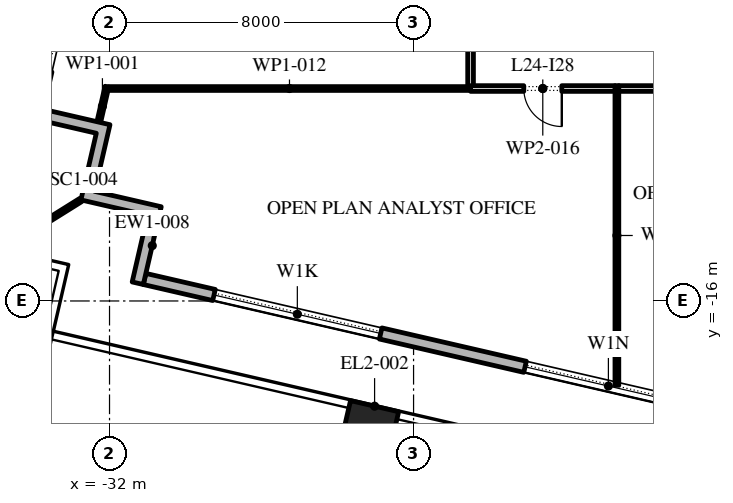
"""IFC4 building model, lengths in metres.
Left out: names, types, materials, properties, quantities, classifications, styles, units other than length and angle.
Written with IfcOpenShell. Run it as: python <this file> out.ifc"""

import sys

from ifc_helpers import new_model, si_unit, direction, frame, frame_2d, origin, origin_2d, place, context, subcontext, project, spatial, polyline, rectangle, outline, extrude, element, fill, save


model = new_model("IFC4")
c1 = context("Model", 3, precision=1e-05, world=origin(), true_north=direction((0.0, 1.0)))
c2 = subcontext(c1, "Body", "Model", "MODEL_VIEW")
j1 = project(units=[si_unit("LENGTHUNIT", "METRE"), si_unit("PLANEANGLEUNIT", "RADIAN")], contexts=[c1])
p1 = place(None, origin())
s1 = spatial("IfcSite", under=j1, at=p1, CompositionType="ELEMENT")
p2 = place(p1, origin())
s2 = spatial("IfcBuilding", under=s1, at=p2, CompositionType="ELEMENT")
p3 = place(p2, frame((0.0, 0.0, 114.0)))
s3 = spatial("IfcBuildingStorey", under=s2, at=p3, CompositionType="ELEMENT", Elevation=114.0)
for number, where, z_axis, x_axis in (
    (1, (-34.282, -17.298, 0.0), (0.0, 0.0, 1.0), (0.974, -0.225, 0.0)),
    (2, (-25.172, -19.402, 0.0), (0.0, 0.0, 1.0), (0.974, -0.225, 0.0)),
):
    element("IfcColumn", number, at=place(p3, frame(where, z_axis=z_axis, x_axis=x_axis)), inside=s3, PredefinedType="COLUMN", context=c2, shape_type="SweptSolid", body=[
        extrude(rectangle(XDim=1.3, YDim=1.3, at=origin_2d()), origin(), (0.0, 0.0, 1.0), 4.2),
    ])
p4 = place(p3, frame((-31.078, -15.421, 0.0), z_axis=(0.0, 0.0, 1.0), x_axis=(0.974370456532, -0.224949357493, 0.0)))
e3 = element("IfcWall", 3, at=p4, inside=s3, PredefinedType="STANDARD", context=c2, shape_type="SweptSolid", body=[
    extrude(rectangle(XDim=51.0, YDim=0.3, at=frame_2d((25.5, 0.0))), origin(), (0.0, 0.0, 1.0), 4.0),
])
p5 = place(p4, frame((1.875, 0.0, 0.45)))
e4 = element("IfcOpeningElement", 4, at=p5, cuts=e3, PredefinedType="OPENING", context=c2, shape_type="SweptSolid", body=[
    extrude(rectangle(XDim=4.5, YDim=2.65, at=frame_2d((2.25, 1.325))), frame((0.0, 0.16, 0.0), z_axis=(0.0, -1.0, 0.0), x_axis=(1.0, 0.0, 0.0)), (0.0, 0.0, 1.0), 0.32),
])
p6 = place(p4, frame((10.275, 0.0, 0.45)))
e5 = element("IfcOpeningElement", 5, at=p6, cuts=e3, PredefinedType="OPENING", context=c2, shape_type="SweptSolid", body=[
    extrude(rectangle(XDim=4.5, YDim=2.525, at=frame_2d((2.25, 1.262))), frame((0.0, 0.16, 0.0), z_axis=(0.0, -1.0, 0.0), x_axis=(1.0, 0.0, 0.0)), (0.0, 0.0, 1.0), 0.32),
])
p7 = place(p4, frame((18.825, 0.0, 0.45)))
e6 = element("IfcOpeningElement", 6, at=p7, cuts=e3, PredefinedType="OPENING", context=c2, shape_type="SweptSolid", body=[
    extrude(rectangle(XDim=4.5, YDim=2.5, at=frame_2d((2.25, 1.25))), frame((0.0, 0.16, 0.0), z_axis=(0.0, -1.0, 0.0), x_axis=(1.0, 0.0, 0.0)), (0.0, 0.0, 1.0), 0.32),
])
p8 = place(p4, frame((27.075, 0.0, 0.0)))
e7 = element("IfcOpeningElement", 7, at=p8, cuts=e3, PredefinedType="OPENING", context=c2, shape_type="SweptSolid", body=[
    extrude(rectangle(XDim=2.4, YDim=2.9, at=frame_2d((1.2, 1.45))), frame((0.0, 0.16, 0.0), z_axis=(0.0, -1.0, 0.0), x_axis=(1.0, 0.0, 0.0)), (0.0, 0.0, 1.0), 0.32),
])
p9 = place(p4, frame((35.925, 0.0, 0.45)))
e8 = element("IfcOpeningElement", 8, at=p9, cuts=e3, PredefinedType="OPENING", context=c2, shape_type="SweptSolid", body=[
    extrude(rectangle(XDim=4.5, YDim=2.45, at=frame_2d((2.25, 1.225))), frame((0.0, 0.16, 0.0), z_axis=(0.0, -1.0, 0.0), x_axis=(1.0, 0.0, 0.0)), (0.0, 0.0, 1.0), 0.32),
])
p10 = place(p4, frame((44.475, 0.0, 0.45)))
e9 = element("IfcOpeningElement", 9, at=p10, cuts=e3, PredefinedType="OPENING", context=c2, shape_type="SweptSolid", body=[
    extrude(rectangle(XDim=4.5, YDim=2.45, at=frame_2d((2.25, 1.225))), frame((0.0, 0.16, 0.0), z_axis=(0.0, -1.0, 0.0), x_axis=(1.0, 0.0, 0.0)), (0.0, 0.0, 1.0), 0.32),
])
p11 = place(p3, frame((-22.82, 37.016, 0.0), z_axis=(0.0, 0.0, 1.0), x_axis=(-0.224953880882, -0.974369412223, 0.0)))
e10 = element("IfcWall", 10, at=p11, inside=s3, PredefinedType="STANDARD", context=c2, shape_type="SweptSolid", body=[
    extrude(rectangle(XDim=49.5, YDim=0.3, at=frame_2d((24.75, 0.0))), origin(), (0.0, 0.0, 1.0), 4.0),
])
p12 = place(p11, frame((1.157, 0.0, 0.45)))
e11 = element("IfcOpeningElement", 11, at=p12, cuts=e10, PredefinedType="OPENING", context=c2, shape_type="SweptSolid", body=[
    extrude(rectangle(XDim=4.5, YDim=3.05, at=frame_2d((2.25, 1.525))), frame((0.0, 0.16, 0.0), z_axis=(0.0, -1.0, 0.0), x_axis=(1.0, 0.0, 0.0)), (0.0, 0.0, 1.0), 0.32),
])
p13 = place(p11, frame((8.121, 0.0, 0.45)))
e12 = element("IfcOpeningElement", 12, at=p13, cuts=e10, PredefinedType="OPENING", context=c2, shape_type="SweptSolid", body=[
    extrude(rectangle(XDim=4.5, YDim=3.05, at=frame_2d((2.25, 1.525))), frame((0.0, 0.16, 0.0), z_axis=(0.0, -1.0, 0.0), x_axis=(1.0, 0.0, 0.0)), (0.0, 0.0, 1.0), 0.32),
])
p14 = place(p11, frame((15.236, 0.0, 0.45)))
e13 = element("IfcOpeningElement", 13, at=p14, cuts=e10, PredefinedType="OPENING", context=c2, shape_type="SweptSolid", body=[
    extrude(rectangle(XDim=4.5, YDim=3.05, at=frame_2d((2.25, 1.525))), frame((0.0, 0.16, 0.0), z_axis=(0.0, -1.0, 0.0), x_axis=(1.0, 0.0, 0.0)), (0.0, 0.0, 1.0), 0.32),
])
p15 = place(p11, frame((23.4, 0.0, 0.0)))
e14 = element("IfcOpeningElement", 14, at=p15, cuts=e10, PredefinedType="OPENING", context=c2, shape_type="SweptSolid", body=[
    extrude(rectangle(XDim=2.4, YDim=3.5, at=frame_2d((1.2, 1.75))), frame((0.0, 0.16, 0.0), z_axis=(0.0, -1.0, 0.0), x_axis=(1.0, 0.0, 0.0)), (0.0, 0.0, 1.0), 0.32),
])
p16 = place(p11, frame((29.464, 0.0, 0.45)))
e15 = element("IfcOpeningElement", 15, at=p16, cuts=e10, PredefinedType="OPENING", context=c2, shape_type="SweptSolid", body=[
    extrude(rectangle(XDim=4.5, YDim=2.875, at=frame_2d((2.25, 1.438))), frame((0.0, 0.16, 0.0), z_axis=(0.0, -1.0, 0.0), x_axis=(1.0, 0.0, 0.0)), (0.0, 0.0, 1.0), 0.32),
])
p17 = place(p11, frame((36.579, 0.0, 0.45)))
e16 = element("IfcOpeningElement", 16, at=p17, cuts=e10, PredefinedType="OPENING", context=c2, shape_type="SweptSolid", body=[
    extrude(rectangle(XDim=4.5, YDim=2.675, at=frame_2d((2.25, 1.337))), frame((0.0, 0.16, 0.0), z_axis=(0.0, -1.0, 0.0), x_axis=(1.0, 0.0, 0.0)), (0.0, 0.0, 1.0), 0.32),
])
p18 = place(p11, frame((43.693, 0.0, 0.45)))
e17 = element("IfcOpeningElement", 17, at=p18, cuts=e10, PredefinedType="OPENING", context=c2, shape_type="SweptSolid", body=[
    extrude(rectangle(XDim=4.5, YDim=3.05, at=frame_2d((2.25, 1.525))), frame((0.0, 0.16, 0.0), z_axis=(0.0, -1.0, 0.0), x_axis=(1.0, 0.0, 0.0)), (0.0, 0.0, 1.0), 0.32),
])
p19 = place(p3, origin())
e18 = element("IfcWall", 18, at=p19, inside=s3, PredefinedType="STANDARD", context=c2, shape_type="SweptSolid", body=[
    extrude(outline(polyline([(-32.393, -13.116), (-30.639, -13.521), (-31.111, -15.567), (-31.404, -15.5), (-30.999, -13.746), (-32.753, -13.341), (-32.348, -11.587), (-33.809, -11.25), (-33.742, -10.957), (-31.988, -11.362), (-32.393, -13.116)])), origin(), (0.0, 0.0, 1.0), 4.0),
])
p20 = place(p3, frame((-32.753, -13.341, -0.05), z_axis=(0.0, 0.0, 1.0), x_axis=(-0.848059759764, -0.529900598103, 0.0)))
e19 = element("IfcWall", 19, at=p20, inside=s3, PredefinedType="STANDARD", context=c2, shape_type="SweptSolid", body=[
    extrude(rectangle(XDim=2.455, YDim=0.1, at=frame_2d((1.228, 0.0))), origin(), (0.0, 0.0, 1.0), 4.05),
])
p21 = place(p3, frame((-32.069, -10.361, 0.0), z_axis=(0.0, 0.0, 1.0), x_axis=(-0.222987762652, -0.974821243976, 0.0)))
e20 = element("IfcWall", 20, at=p21, inside=s3, PredefinedType="PARTITIONING", context=c2, shape_type="SweptSolid", body=[
    extrude(rectangle(XDim=1.058, YDim=0.1, at=frame_2d((0.529, 0.0))), origin(), (0.0, 0.0, 1.0), 4.0),
])
p22 = place(p3, frame((-22.5, -10.41, 0.0), z_axis=(0.0, 0.0, 1.0), x_axis=(-1.0, 0.0, 0.0)))
e21 = element("IfcWall", 21, at=p22, inside=s3, PredefinedType="PARTITIONING", context=c2, shape_type="SweptSolid", body=[
    extrude(rectangle(XDim=9.53, YDim=0.1, at=frame_2d((4.765, 0.0))), origin(), (0.0, 0.0, 1.0), 4.0),
])
p23 = place(p3, frame((-22.5, -10.36, 0.0), z_axis=(0.0, 0.0, 1.0), x_axis=(0.0, 1.0, 0.0)))
e22 = element("IfcWall", 22, at=p23, inside=s3, PredefinedType="PARTITIONING", context=c2, shape_type="SweptSolid", body=[
    extrude(rectangle(XDim=2.735, YDim=0.15, at=frame_2d((1.368, 0.0))), origin(), (0.0, 0.0, 1.0), 4.0),
])
p24 = place(p3, frame((-18.65, -18.219, 0.0), z_axis=(0.0, 0.0, 1.0), x_axis=(0.0, 1.0, 0.0)))
e23 = element("IfcWall", 23, at=p24, inside=s3, PredefinedType="PARTITIONING", context=c2, shape_type="SweptSolid", body=[
    extrude(rectangle(XDim=7.884, YDim=0.1, at=frame_2d((3.942, 0.0))), origin(), (0.0, 0.0, 1.0), 4.0),
])
p25 = place(p3, frame((-18.7, -10.41, 0.0), z_axis=(0.0, 0.0, 1.0), x_axis=(-1.0, 0.0, 0.0)))
e24 = element("IfcWall", 24, at=p25, inside=s3, PredefinedType="PARTITIONING", context=c2, shape_type="SweptSolid", body=[
    extrude(rectangle(XDim=3.8, YDim=0.15, at=frame_2d((1.9, 0.0))), origin(), (0.0, 0.0, 1.0), 4.0),
])
p26 = place(p25, frame((1.4, 0.0, 0.0)))
e25 = element("IfcOpeningElement", 25, at=p26, cuts=e24, PredefinedType="OPENING", context=c2, shape_type="SweptSolid", body=[
    extrude(rectangle(XDim=1.0, YDim=2.1, at=frame_2d((0.5, 1.05))), frame((0.0, 0.085, 0.0), z_axis=(0.0, -1.0, 0.0), x_axis=(1.0, 0.0, 0.0)), (0.0, 0.0, 1.0), 0.17),
])
p27 = place(p3, frame((-14.72, -10.41, 0.0), z_axis=(0.0, 0.0, 1.0), x_axis=(-1.0, 0.0, 0.0)))
e26 = element("IfcWall", 26, at=p27, inside=s3, PredefinedType="PARTITIONING", context=c2, shape_type="SweptSolid", body=[
    extrude(rectangle(XDim=3.88, YDim=0.15, at=frame_2d((1.94, 0.0))), origin(), (0.0, 0.0, 1.0), 4.0),
])
p28 = place(p27, frame((1.03, 0.0, 0.0)))
e27 = element("IfcOpeningElement", 27, at=p28, cuts=e26, PredefinedType="OPENING", context=c2, shape_type="SweptSolid", body=[
    extrude(rectangle(XDim=1.0, YDim=2.1, at=frame_2d((0.5, 1.05))), frame((0.0, 0.085, 0.0), z_axis=(0.0, -1.0, 0.0), x_axis=(1.0, 0.0, 0.0)), (0.0, 0.0, 1.0), 0.17),
])
p29 = place(p5, origin())
e28 = element("IfcWindow", 28, at=p29, inside=s3, PartitioningType="DOUBLE_PANEL_VERTICAL", PredefinedType="WINDOW", context=c2, shape_type="SweptSolid", body=[
    extrude(rectangle(XDim=4.5, YDim=2.65, at=frame_2d((2.25, 1.325))), frame((0.0, 0.03, 0.0), z_axis=(0.0, -1.0, 0.0), x_axis=(1.0, 0.0, 0.0)), (0.0, 0.0, 1.0), 0.06),
])
fill(e4, e28)
p30 = place(p6, origin())
e29 = element("IfcWindow", 29, at=p30, inside=s3, PartitioningType="DOUBLE_PANEL_VERTICAL", PredefinedType="WINDOW", context=c2, shape_type="SweptSolid", body=[
    extrude(rectangle(XDim=4.5, YDim=2.525, at=frame_2d((2.25, 1.262))), frame((0.0, 0.03, 0.0), z_axis=(0.0, -1.0, 0.0), x_axis=(1.0, 0.0, 0.0)), (0.0, 0.0, 1.0), 0.06),
])
fill(e5, e29)
p31 = place(p18, origin())
e30 = element("IfcWindow", 30, at=p31, inside=s3, PartitioningType="DOUBLE_PANEL_VERTICAL", PredefinedType="WINDOW", context=c2, shape_type="SweptSolid", body=[
    extrude(rectangle(XDim=4.5, YDim=3.05, at=frame_2d((2.25, 1.525))), frame((0.0, 0.03, 0.0), z_axis=(0.0, -1.0, 0.0), x_axis=(1.0, 0.0, 0.0)), (0.0, 0.0, 1.0), 0.06),
])
fill(e17, e30)
p32 = place(p26, origin())
e31 = element("IfcDoor", 31, at=p32, inside=s3, OperationType="SINGLE_SWING_RIGHT", PredefinedType="DOOR", context=c2, shape_type="SweptSolid", body=[
    extrude(rectangle(XDim=1.0, YDim=2.1, at=frame_2d((0.5, 1.05))), frame((0.0, 0.025, 0.0), z_axis=(0.0, -1.0, 0.0), x_axis=(1.0, 0.0, 0.0)), (0.0, 0.0, 1.0), 0.05),
])
fill(e25, e31)
save(model, sys.argv[1])
